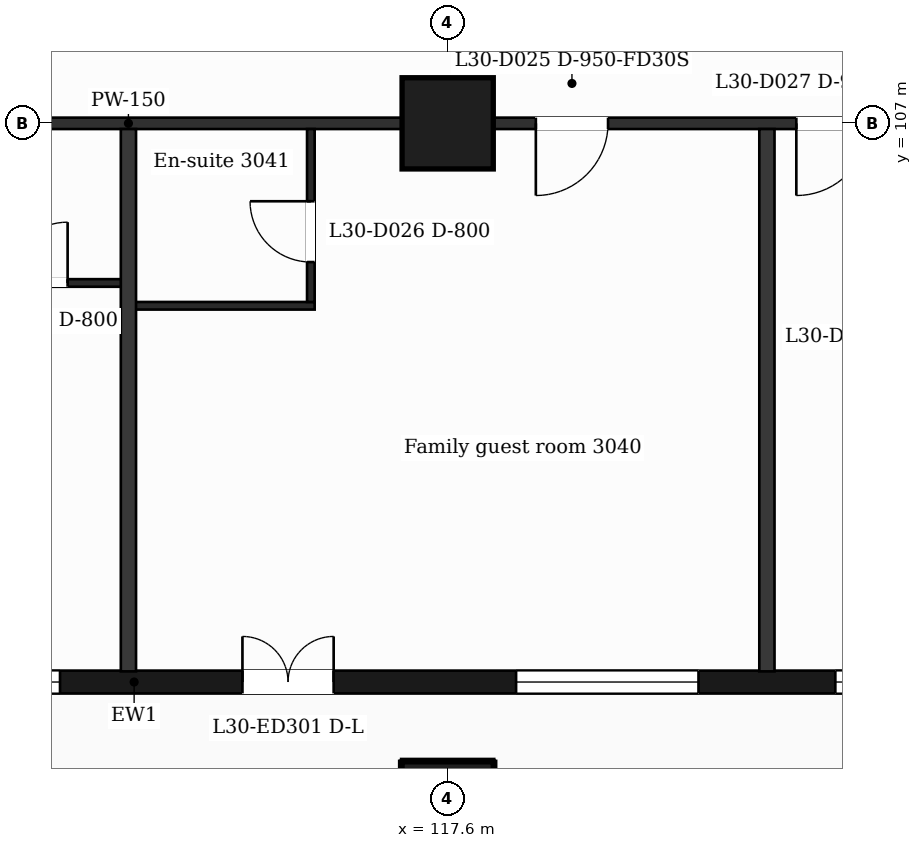
"""IFC4 building model, lengths in metres.
Left out: names, types, materials, properties, quantities, classifications, styles, units other than length and angle.
Written with IfcOpenShell. Run it as: python <this file> out.ifc"""

import sys

from ifc_helpers import new_model, si_unit, direction, frame, frame_2d, origin, origin_2d, place, context, subcontext, project, spatial, rectangle, extrude, element, fill, save


model = new_model("IFC4")
c1 = context("Model", 3, precision=1e-05, world=origin(), true_north=direction((0.0, 1.0)))
c2 = subcontext(c1, "Body", "Model", "MODEL_VIEW")
j1 = project(units=[si_unit("LENGTHUNIT", "METRE"), si_unit("PLANEANGLEUNIT", "RADIAN")], contexts=[c1])
p1 = place(None, origin())
s1 = spatial("IfcSite", under=j1, at=p1, CompositionType="ELEMENT")
p2 = place(p1, origin())
s2 = spatial("IfcBuilding", under=s1, at=p2, CompositionType="ELEMENT")
p3 = place(p2, frame((0.0, 0.0, 128.0)))
s3 = spatial("IfcBuildingStorey", under=s2, at=p3, CompositionType="ELEMENT", Elevation=128.0)
for number, where, z_axis, x_axis in (
    (1, (117.6, 98.0, 0.0), (0.0, 0.0, 1.0), (1.0, 0.0, 0.0)),
    (2, (117.6, 107.0, 0.0), (0.0, 0.0, 1.0), (1.0, 0.0, 0.0)),
):
    element("IfcColumn", number, at=place(p3, frame(where, z_axis=z_axis, x_axis=x_axis)), inside=s3, PredefinedType="COLUMN", context=c2, shape_type="SweptSolid", body=[
        extrude(rectangle(XDim=1.2, YDim=1.2, at=origin_2d()), origin(), (0.0, 0.0, 1.0), 3.7),
    ])
p4 = place(p3, frame((89.85, 99.65, 0.0), z_axis=(0.0, 0.0, 1.0), x_axis=(1.0, 0.0, 0.0)))
e3 = element("IfcWall", 3, at=p4, inside=s3, PredefinedType="SOLIDWALL", context=c2, shape_type="SweptSolid", body=[
    extrude(rectangle(XDim=47.25, YDim=0.3, at=frame_2d((23.625, 0.0))), origin(), (0.0, 0.0, 1.0), 3.38),
])
p5 = place(p4, frame((0.725, 0.0, 0.9)))
e4 = element("IfcOpeningElement", 4, at=p5, cuts=e3, PredefinedType="OPENING", context=c2, shape_type="SweptSolid", body=[
    extrude(rectangle(XDim=1.2, YDim=2.1, at=frame_2d((0.6, 1.05))), frame((0.0, 0.16, 0.0), z_axis=(0.0, -1.0, 0.0), x_axis=(1.0, 0.0, 0.0)), (0.0, 0.0, 1.0), 0.32),
])
p6 = place(p4, frame((3.45, 0.0, 0.9)))
e5 = element("IfcOpeningElement", 5, at=p6, cuts=e3, PredefinedType="OPENING", context=c2, shape_type="SweptSolid", body=[
    extrude(rectangle(XDim=2.4, YDim=2.1, at=frame_2d((1.2, 1.05))), frame((0.0, 0.16, 0.0), z_axis=(0.0, -1.0, 0.0), x_axis=(1.0, 0.0, 0.0)), (0.0, 0.0, 1.0), 0.32),
])
p7 = place(p4, frame((8.25, 0.0, 0.9)))
e6 = element("IfcOpeningElement", 6, at=p7, cuts=e3, PredefinedType="OPENING", context=c2, shape_type="SweptSolid", body=[
    extrude(rectangle(XDim=1.2, YDim=2.1, at=frame_2d((0.6, 1.05))), frame((0.0, 0.16, 0.0), z_axis=(0.0, -1.0, 0.0), x_axis=(1.0, 0.0, 0.0)), (0.0, 0.0, 1.0), 0.32),
])
p8 = place(p4, frame((12.45, 0.0, 0.9)))
e7 = element("IfcOpeningElement", 7, at=p8, cuts=e3, PredefinedType="OPENING", context=c2, shape_type="SweptSolid", body=[
    extrude(rectangle(XDim=1.2, YDim=2.1, at=frame_2d((0.6, 1.05))), frame((0.0, 0.16, 0.0), z_axis=(0.0, -1.0, 0.0), x_axis=(1.0, 0.0, 0.0)), (0.0, 0.0, 1.0), 0.32),
])
p9 = place(p4, frame((16.05, 0.0, 0.9)))
e8 = element("IfcOpeningElement", 8, at=p9, cuts=e3, PredefinedType="OPENING", context=c2, shape_type="SweptSolid", body=[
    extrude(rectangle(XDim=2.4, YDim=2.1, at=frame_2d((1.2, 1.05))), frame((0.0, 0.16, 0.0), z_axis=(0.0, -1.0, 0.0), x_axis=(1.0, 0.0, 0.0)), (0.0, 0.0, 1.0), 0.32),
])
p10 = place(p4, frame((20.25, 0.0, 0.9)))
e9 = element("IfcOpeningElement", 9, at=p10, cuts=e3, PredefinedType="OPENING", context=c2, shape_type="SweptSolid", body=[
    extrude(rectangle(XDim=2.4, YDim=2.1, at=frame_2d((1.2, 1.05))), frame((0.0, 0.16, 0.0), z_axis=(0.0, -1.0, 0.0), x_axis=(1.0, 0.0, 0.0)), (0.0, 0.0, 1.0), 0.32),
])
p11 = place(p4, frame((25.05, 0.0, 0.0)))
e10 = element("IfcOpeningElement", 10, at=p11, cuts=e3, PredefinedType="OPENING", context=c2, shape_type="SweptSolid", body=[
    extrude(rectangle(XDim=1.2, YDim=2.4, at=frame_2d((0.6, 1.2))), frame((0.0, 0.16, 0.0), z_axis=(0.0, -1.0, 0.0), x_axis=(1.0, 0.0, 0.0)), (0.0, 0.0, 1.0), 0.32),
])
p12 = place(p4, frame((28.65, 0.0, 0.9)))
e11 = element("IfcOpeningElement", 11, at=p12, cuts=e3, PredefinedType="OPENING", context=c2, shape_type="SweptSolid", body=[
    extrude(rectangle(XDim=2.4, YDim=2.1, at=frame_2d((1.2, 1.05))), frame((0.0, 0.16, 0.0), z_axis=(0.0, -1.0, 0.0), x_axis=(1.0, 0.0, 0.0)), (0.0, 0.0, 1.0), 0.32),
])
p13 = place(p4, frame((32.85, 0.0, 0.9)))
e12 = element("IfcOpeningElement", 12, at=p13, cuts=e3, PredefinedType="OPENING", context=c2, shape_type="SweptSolid", body=[
    extrude(rectangle(XDim=2.4, YDim=2.1, at=frame_2d((1.2, 1.05))), frame((0.0, 0.16, 0.0), z_axis=(0.0, -1.0, 0.0), x_axis=(1.0, 0.0, 0.0)), (0.0, 0.0, 1.0), 0.32),
])
p14 = place(p4, frame((37.65, 0.0, 0.9)))
e13 = element("IfcOpeningElement", 13, at=p14, cuts=e3, PredefinedType="OPENING", context=c2, shape_type="SweptSolid", body=[
    extrude(rectangle(XDim=1.2, YDim=2.1, at=frame_2d((0.6, 1.05))), frame((0.0, 0.16, 0.0), z_axis=(0.0, -1.0, 0.0), x_axis=(1.0, 0.0, 0.0)), (0.0, 0.0, 1.0), 0.32),
])
p15 = place(p4, frame((41.85, 0.0, 0.9)))
e14 = element("IfcOpeningElement", 14, at=p15, cuts=e3, PredefinedType="OPENING", context=c2, shape_type="SweptSolid", body=[
    extrude(rectangle(XDim=1.2, YDim=2.1, at=frame_2d((0.6, 1.05))), frame((0.0, 0.16, 0.0), z_axis=(0.0, -1.0, 0.0), x_axis=(1.0, 0.0, 0.0)), (0.0, 0.0, 1.0), 0.32),
])
p16 = place(p4, frame((45.25, 0.0, 0.9)))
e15 = element("IfcOpeningElement", 15, at=p16, cuts=e3, PredefinedType="OPENING", context=c2, shape_type="SweptSolid", body=[
    extrude(rectangle(XDim=1.2, YDim=2.1, at=frame_2d((0.6, 1.05))), frame((0.0, 0.16, 0.0), z_axis=(0.0, -1.0, 0.0), x_axis=(1.0, 0.0, 0.0)), (0.0, 0.0, 1.0), 0.32),
])
p17 = place(p3, frame((113.4, 104.6, 0.0), z_axis=(0.0, 0.0, 1.0), x_axis=(1.0, 0.0, 0.0)))
e16 = element("IfcWall", 16, at=p17, inside=s3, PredefinedType="PARTITIONING", context=c2, shape_type="SweptSolid", body=[
    extrude(rectangle(XDim=2.45, YDim=0.1, at=frame_2d((1.225, 0.0))), origin(), (0.0, 0.0, 1.0), 3.38),
])
p18 = place(p3, frame((110.95, 104.9, 0.0), z_axis=(0.0, 0.0, 1.0), x_axis=(1.0, 0.0, 0.0)))
e17 = element("IfcWall", 17, at=p18, inside=s3, PredefinedType="PARTITIONING", context=c2, shape_type="SweptSolid", body=[
    extrude(rectangle(XDim=2.45, YDim=0.1, at=frame_2d((1.225, 0.0))), origin(), (0.0, 0.0, 1.0), 3.38),
])
p19 = place(p18, frame((0.85, 0.0, 0.0)))
e18 = element("IfcOpeningElement", 18, at=p19, cuts=e17, PredefinedType="OPENING", context=c2, shape_type="SweptSolid", body=[
    extrude(rectangle(XDim=0.8, YDim=2.1, at=frame_2d((0.4, 1.05))), frame((0.0, 0.06, 0.0), z_axis=(0.0, -1.0, 0.0), x_axis=(1.0, 0.0, 0.0)), (0.0, 0.0, 1.0), 0.12),
])
p20 = place(p3, frame((87.018, 107.0, 0.0), z_axis=(0.0, 0.0, 1.0), x_axis=(1.0, 0.0, 0.0)))
e19 = element("IfcWall", 19, at=p20, inside=s3, PredefinedType="PARTITIONING", context=c2, shape_type="SweptSolid", body=[
    extrude(rectangle(XDim=52.765, YDim=0.15, at=frame_2d((26.382, 0.0))), origin(), (0.0, 0.0, 1.0), 3.38),
])
p21 = place(p20, frame((1.276, 0.0, 0.0)))
e20 = element("IfcOpeningElement", 20, at=p21, cuts=e19, PredefinedType="OPENING", context=c2, shape_type="SweptSolid", body=[
    extrude(rectangle(XDim=0.95, YDim=2.1, at=frame_2d((0.475, 1.05))), frame((0.0, 0.085, 0.0), z_axis=(0.0, -1.0, 0.0), x_axis=(1.0, 0.0, 0.0)), (0.0, 0.0, 1.0), 0.17),
])
p22 = place(p20, frame((7.645, 0.0, 0.0)))
e21 = element("IfcOpeningElement", 21, at=p22, cuts=e19, PredefinedType="OPENING", context=c2, shape_type="SweptSolid", body=[
    extrude(rectangle(XDim=0.95, YDim=2.1, at=frame_2d((0.475, 1.05))), frame((0.0, 0.085, 0.0), z_axis=(0.0, -1.0, 0.0), x_axis=(1.0, 0.0, 0.0)), (0.0, 0.0, 1.0), 0.17),
])
p23 = place(p20, frame((16.812, 0.0, 0.0)))
e22 = element("IfcOpeningElement", 22, at=p23, cuts=e19, PredefinedType="OPENING", context=c2, shape_type="SweptSolid", body=[
    extrude(rectangle(XDim=1.0, YDim=2.1, at=frame_2d((0.5, 1.05))), frame((0.0, 0.085, 0.0), z_axis=(0.0, -1.0, 0.0), x_axis=(1.0, 0.0, 0.0)), (0.0, 0.0, 1.0), 0.17),
])
p24 = place(p20, frame((22.952, 0.0, 0.0)))
e23 = element("IfcOpeningElement", 23, at=p24, cuts=e19, PredefinedType="OPENING", context=c2, shape_type="SweptSolid", body=[
    extrude(rectangle(XDim=0.95, YDim=2.1, at=frame_2d((0.475, 1.05))), frame((0.0, 0.085, 0.0), z_axis=(0.0, -1.0, 0.0), x_axis=(1.0, 0.0, 0.0)), (0.0, 0.0, 1.0), 0.17),
])
p25 = place(p20, frame((31.742, 0.0, 0.0)))
e24 = element("IfcOpeningElement", 24, at=p25, cuts=e19, PredefinedType="OPENING", context=c2, shape_type="SweptSolid", body=[
    extrude(rectangle(XDim=0.95, YDim=2.1, at=frame_2d((0.475, 1.05))), frame((0.0, 0.085, 0.0), z_axis=(0.0, -1.0, 0.0), x_axis=(1.0, 0.0, 0.0)), (0.0, 0.0, 1.0), 0.17),
])
p26 = place(p20, frame((35.169, 0.0, 0.0)))
e25 = element("IfcOpeningElement", 25, at=p26, cuts=e19, PredefinedType="OPENING", context=c2, shape_type="SweptSolid", body=[
    extrude(rectangle(XDim=0.95, YDim=2.1, at=frame_2d((0.475, 1.05))), frame((0.0, 0.085, 0.0), z_axis=(0.0, -1.0, 0.0), x_axis=(1.0, 0.0, 0.0)), (0.0, 0.0, 1.0), 0.17),
])
p27 = place(p20, frame((41.807, 0.0, 0.0)))
e26 = element("IfcOpeningElement", 26, at=p27, cuts=e19, PredefinedType="OPENING", context=c2, shape_type="SweptSolid", body=[
    extrude(rectangle(XDim=0.95, YDim=2.1, at=frame_2d((0.475, 1.05))), frame((0.0, 0.085, 0.0), z_axis=(0.0, -1.0, 0.0), x_axis=(1.0, 0.0, 0.0)), (0.0, 0.0, 1.0), 0.17),
])
p28 = place(p20, frame((43.832, 0.0, 0.0)))
e27 = element("IfcOpeningElement", 27, at=p28, cuts=e19, PredefinedType="OPENING", context=c2, shape_type="SweptSolid", body=[
    extrude(rectangle(XDim=0.95, YDim=2.1, at=frame_2d((0.475, 1.05))), frame((0.0, 0.085, 0.0), z_axis=(0.0, -1.0, 0.0), x_axis=(1.0, 0.0, 0.0)), (0.0, 0.0, 1.0), 0.17),
])
p29 = place(p20, frame((48.974, 0.0, 0.0)))
e28 = element("IfcOpeningElement", 28, at=p29, cuts=e19, PredefinedType="OPENING", context=c2, shape_type="SweptSolid", body=[
    extrude(rectangle(XDim=0.95, YDim=2.1, at=frame_2d((0.475, 1.05))), frame((0.0, 0.085, 0.0), z_axis=(0.0, -1.0, 0.0), x_axis=(1.0, 0.0, 0.0)), (0.0, 0.0, 1.0), 0.17),
])
p30 = place(p3, frame((113.4, 99.79, 0.0), z_axis=(0.0, 0.0, 1.0), x_axis=(0.0, 1.0, 0.0)))
e29 = element("IfcWall", 29, at=p30, inside=s3, PredefinedType="PARTITIONING", context=c2, shape_type="SweptSolid", body=[
    extrude(rectangle(XDim=7.135, YDim=0.2, at=frame_2d((3.567, 0.0))), origin(), (0.0, 0.0, 1.0), 3.38),
])
p31 = place(p3, frame((115.8, 104.65, 0.0), z_axis=(0.0, 0.0, 1.0), x_axis=(0.0, 1.0, 0.0)))
e30 = element("IfcWall", 30, at=p31, inside=s3, PredefinedType="PARTITIONING", context=c2, shape_type="SweptSolid", body=[
    extrude(rectangle(XDim=2.275, YDim=0.1, at=frame_2d((1.138, 0.0))), origin(), (0.0, 0.0, 1.0), 3.38),
])
p32 = place(p31, frame((0.525, 0.0, 0.0)))
e31 = element("IfcOpeningElement", 31, at=p32, cuts=e30, PredefinedType="OPENING", context=c2, shape_type="SweptSolid", body=[
    extrude(rectangle(XDim=0.8, YDim=2.1, at=frame_2d((0.4, 1.05))), frame((0.0, 0.06, 0.0), z_axis=(0.0, -1.0, 0.0), x_axis=(1.0, 0.0, 0.0)), (0.0, 0.0, 1.0), 0.12),
])
p33 = place(p3, frame((121.8, 99.79, 0.0), z_axis=(0.0, 0.0, 1.0), x_axis=(0.0, 1.0, 0.0)))
e32 = element("IfcWall", 32, at=p33, inside=s3, PredefinedType="PARTITIONING", context=c2, shape_type="SweptSolid", body=[
    extrude(rectangle(XDim=7.135, YDim=0.2, at=frame_2d((3.567, 0.0))), origin(), (0.0, 0.0, 1.0), 3.38),
])
p34 = place(p10, origin())
e33 = element("IfcWindow", 33, at=p34, inside=s3, PartitioningType="SINGLE_PANEL", PredefinedType="WINDOW", context=c2, shape_type="SweptSolid", body=[
    extrude(rectangle(XDim=2.4, YDim=2.1, at=frame_2d((1.2, 1.05))), frame((0.0, 0.03, 0.0), z_axis=(0.0, -1.0, 0.0), x_axis=(1.0, 0.0, 0.0)), (0.0, 0.0, 1.0), 0.06),
])
fill(e9, e33)
p35 = place(p11, origin())
e34 = element("IfcDoor", 34, at=p35, inside=s3, OperationType="DOUBLE_DOOR_SINGLE_SWING", PredefinedType="DOOR", context=c2, shape_type="SweptSolid", body=[
    extrude(rectangle(XDim=1.2, YDim=2.4, at=frame_2d((0.6, 1.2))), frame((0.0, 0.025, 0.0), z_axis=(0.0, -1.0, 0.0), x_axis=(1.0, 0.0, 0.0)), (0.0, 0.0, 1.0), 0.05),
])
fill(e10, e34)
p36 = place(p12, origin())
e35 = element("IfcWindow", 35, at=p36, inside=s3, PartitioningType="SINGLE_PANEL", PredefinedType="WINDOW", context=c2, shape_type="SweptSolid", body=[
    extrude(rectangle(XDim=2.4, YDim=2.1, at=frame_2d((1.2, 1.05))), frame((0.0, 0.03, 0.0), z_axis=(0.0, -1.0, 0.0), x_axis=(1.0, 0.0, 0.0)), (0.0, 0.0, 1.0), 0.06),
])
fill(e11, e35)
p37 = place(p13, origin())
e36 = element("IfcWindow", 36, at=p37, inside=s3, PartitioningType="SINGLE_PANEL", PredefinedType="WINDOW", context=c2, shape_type="SweptSolid", body=[
    extrude(rectangle(XDim=2.4, YDim=2.1, at=frame_2d((1.2, 1.05))), frame((0.0, 0.03, 0.0), z_axis=(0.0, -1.0, 0.0), x_axis=(1.0, 0.0, 0.0)), (0.0, 0.0, 1.0), 0.06),
])
fill(e12, e36)
p38 = place(p19, origin())
e37 = element("IfcDoor", 37, at=p38, inside=s3, OperationType="SINGLE_SWING_RIGHT", PredefinedType="DOOR", context=c2, shape_type="SweptSolid", body=[
    extrude(rectangle(XDim=0.8, YDim=2.1, at=frame_2d((0.4, 1.05))), frame((0.0, 0.025, 0.0), z_axis=(0.0, -1.0, 0.0), x_axis=(1.0, 0.0, 0.0)), (0.0, 0.0, 1.0), 0.05),
])
fill(e18, e37)
p39 = place(p25, origin())
e38 = element("IfcDoor", 38, at=p39, inside=s3, OperationType="SINGLE_SWING_LEFT", PredefinedType="DOOR", context=c2, shape_type="SweptSolid", body=[
    extrude(rectangle(XDim=0.95, YDim=2.1, at=frame_2d((0.475, 1.05))), frame((0.0, 0.025, 0.0), z_axis=(0.0, -1.0, 0.0), x_axis=(1.0, 0.0, 0.0)), (0.0, 0.0, 1.0), 0.05),
])
fill(e24, e38)
p40 = place(p32, origin())
e39 = element("IfcDoor", 39, at=p40, inside=s3, OperationType="SINGLE_SWING_RIGHT", PredefinedType="DOOR", context=c2, shape_type="SweptSolid", body=[
    extrude(rectangle(XDim=0.8, YDim=2.1, at=frame_2d((0.4, 1.05))), frame((0.0, 0.025, 0.0), z_axis=(0.0, -1.0, 0.0), x_axis=(1.0, 0.0, 0.0)), (0.0, 0.0, 1.0), 0.05),
])
fill(e31, e39)
p41 = place(p26, origin())
e40 = element("IfcDoor", 40, at=p41, inside=s3, OperationType="SINGLE_SWING_LEFT", PredefinedType="DOOR", context=c2, shape_type="SweptSolid", body=[
    extrude(rectangle(XDim=0.95, YDim=2.1, at=frame_2d((0.475, 1.05))), frame((0.0, 0.025, 0.0), z_axis=(0.0, -1.0, 0.0), x_axis=(1.0, 0.0, 0.0)), (0.0, 0.0, 1.0), 0.05),
])
fill(e25, e40)
save(model, sys.argv[1])
